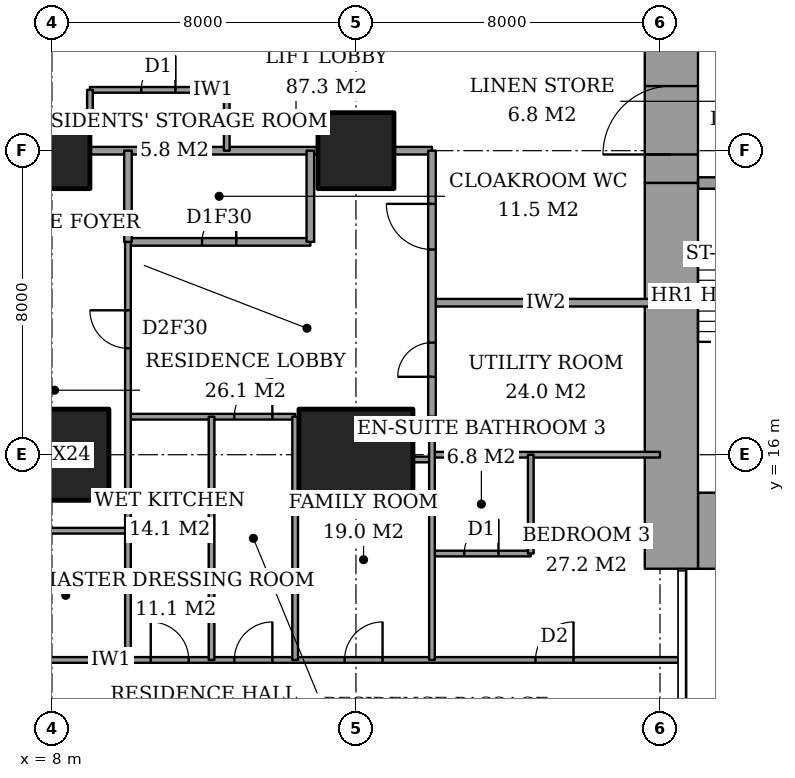
"""IFC4 building model, lengths in metres.
Left out: names, types, materials, properties, quantities, classifications, styles, units other than length and angle.
Written with IfcOpenShell. Run it as: python <this file> out.ifc"""

import sys

from ifc_helpers import new_model, si_unit, direction, frame, frame_2d, origin, origin_2d, place, context, subcontext, project, spatial, rectangle, extrude, element, fill, save


model = new_model("IFC4")
c1 = context("Model", 3, precision=1e-05, world=origin(), true_north=direction((0.0, 1.0)))
c2 = subcontext(c1, "Body", "Model", "MODEL_VIEW")
j1 = project(units=[si_unit("LENGTHUNIT", "METRE"), si_unit("PLANEANGLEUNIT", "RADIAN")], contexts=[c1])
p1 = place(None, origin())
s1 = spatial("IfcSite", under=j1, at=p1, CompositionType="ELEMENT")
p2 = place(p1, origin())
s2 = spatial("IfcBuilding", under=s1, at=p2, CompositionType="ELEMENT")
p3 = place(p2, frame((0.0, 0.0, 51.2)))
s3 = spatial("IfcBuildingStorey", under=s2, at=p3, CompositionType="ELEMENT", Elevation=51.2)
p4 = place(p3, frame((8.0, 16.0, 0.0), z_axis=(0.0, 0.0, 1.0), x_axis=(1.0, 0.0, 0.0)))
e1 = element("IfcColumn", 1, at=p4, inside=s3, PredefinedType="COLUMN", context=c2, shape_type="SweptSolid", body=[
    extrude(rectangle(XDim=3.0, YDim=2.4, at=origin_2d()), origin(), (0.0, 0.0, 1.0), 3.6),
])
p5 = place(p3, frame((8.0, 24.0, 0.0), z_axis=(0.0, 0.0, 1.0), x_axis=(1.0, 0.0, 0.0)))
e2 = element("IfcColumn", 2, at=p5, inside=s3, PredefinedType="COLUMN", context=c2, shape_type="SweptSolid", body=[
    extrude(rectangle(XDim=2.0, YDim=2.0, at=origin_2d()), origin(), (0.0, 0.0, 1.0), 3.6),
])
p6 = place(p3, frame((16.0, 16.0, 0.0), z_axis=(0.0, 0.0, 1.0), x_axis=(1.0, 0.0, 0.0)))
e3 = element("IfcColumn", 3, at=p6, inside=s3, PredefinedType="COLUMN", context=c2, shape_type="SweptSolid", body=[
    extrude(rectangle(XDim=3.0, YDim=2.4, at=origin_2d()), origin(), (0.0, 0.0, 1.0), 3.6),
])
p7 = place(p3, frame((16.0, 24.0, 0.0), z_axis=(0.0, 0.0, 1.0), x_axis=(1.0, 0.0, 0.0)))
e4 = element("IfcColumn", 4, at=p7, inside=s3, PredefinedType="COLUMN", context=c2, shape_type="SweptSolid", body=[
    extrude(rectangle(XDim=2.0, YDim=2.0, at=origin_2d()), origin(), (0.0, 0.0, 1.0), 3.6),
])
p8 = place(p3, frame((25.0, 14.0, 0.0), z_axis=(0.0, 0.0, 1.0), x_axis=(1.0, 0.0, 0.0)))
e5 = element("IfcWall", 5, at=p8, inside=s3, PredefinedType="SHEAR", context=c2, shape_type="SweptSolid", body=[
    extrude(rectangle(XDim=3.15, YDim=2.0, at=frame_2d((1.575, 0.0))), origin(), (0.0, 0.0, 1.0), 3.6),
])
p9 = place(p3, frame((24.3, 13.0, 0.0), z_axis=(0.0, 0.0, 1.0), x_axis=(0.0, 1.0, 0.0)))
e6 = element("IfcWall", 6, at=p9, inside=s3, PredefinedType="SHEAR", context=c2, shape_type="SweptSolid", body=[
    extrude(rectangle(XDim=10.15, YDim=1.4, at=frame_2d((5.075, 0.0))), origin(), (0.0, 0.0, 1.0), 3.6),
])
p10 = place(p3, frame((24.3, 23.15, 0.0), z_axis=(0.0, 0.0, 1.0), x_axis=(0.0, 1.0, 0.0)))
e7 = element("IfcWall", 7, at=p10, inside=s3, PredefinedType="SHEAR", context=c2, shape_type="SweptSolid", body=[
    extrude(rectangle(XDim=11.85, YDim=1.4, at=frame_2d((5.925, 0.0))), origin(), (0.0, 0.0, 1.0), 3.6),
])
p11 = place(p10, frame((0.75, 0.0, 0.0)))
e8 = element("IfcOpeningElement", 8, at=p11, cuts=e7, PredefinedType="OPENING", context=c2, shape_type="SweptSolid", body=[
    extrude(rectangle(XDim=1.8, YDim=2.4, at=frame_2d((0.9, 1.2))), frame((0.0, 0.71, 0.0), z_axis=(0.0, -1.0, 0.0), x_axis=(1.0, 0.0, 0.0)), (0.0, 0.0, 1.0), 1.42),
])
p12 = place(p3, frame((25.0, 23.15, 0.0), z_axis=(0.0, 0.0, 1.0), x_axis=(1.0, 0.0, 0.0)))
e9 = element("IfcWall", 9, at=p12, inside=s3, PredefinedType="SHEAR", context=c2, shape_type="SweptSolid", body=[
    extrude(rectangle(XDim=3.15, YDim=0.3, at=frame_2d((1.575, 0.0))), origin(), (0.0, 0.0, 1.0), 3.6),
])
p13 = place(p12, frame((0.6, 0.0, 0.0)))
e10 = element("IfcOpeningElement", 10, at=p13, cuts=e9, PredefinedType="OPENING", context=c2, shape_type="SweptSolid", body=[
    extrude(rectangle(XDim=1.0, YDim=2.1, at=frame_2d((0.5, 1.05))), frame((0.0, 0.16, 0.0), z_axis=(0.0, -1.0, 0.0), x_axis=(1.0, 0.0, 0.0)), (0.0, 0.0, 1.0), 0.32),
])
p14 = place(p3, frame((-0.45, 10.6, 0.0), z_axis=(0.0, 0.0, 1.0), x_axis=(1.0, 0.0, 0.0)))
e11 = element("IfcWall", 11, at=p14, inside=s3, PredefinedType="PARTITIONING", context=c2, shape_type="SweptSolid", body=[
    extrude(rectangle(XDim=25.011, YDim=0.15, at=frame_2d((12.505, 0.0))), origin(), (0.0, 0.0, 1.0), 3.35),
])
p15 = place(p14, frame((13.25, 0.0, 0.0)))
e12 = element("IfcOpeningElement", 12, at=p15, cuts=e11, PredefinedType="OPENING", context=c2, shape_type="SweptSolid", body=[
    extrude(rectangle(XDim=1.0, YDim=2.1, at=frame_2d((0.5, 1.05))), frame((0.0, 0.085, 0.0), z_axis=(0.0, -1.0, 0.0), x_axis=(1.0, 0.0, 0.0)), (0.0, 0.0, 1.0), 0.17),
])
p16 = place(p14, frame((3.087, 0.0, 0.0)))
e13 = element("IfcOpeningElement", 13, at=p16, cuts=e11, PredefinedType="OPENING", context=c2, shape_type="SweptSolid", body=[
    extrude(rectangle(XDim=1.0, YDim=2.1, at=frame_2d((0.5, 1.05))), frame((0.0, 0.085, 0.0), z_axis=(0.0, -1.0, 0.0), x_axis=(1.0, 0.0, 0.0)), (0.0, 0.0, 1.0), 0.17),
])
p17 = place(p14, frame((11.05, 0.0, 0.0)))
e14 = element("IfcOpeningElement", 14, at=p17, cuts=e11, PredefinedType="OPENING", context=c2, shape_type="SweptSolid", body=[
    extrude(rectangle(XDim=1.0, YDim=2.1, at=frame_2d((0.5, 1.05))), frame((0.0, 0.085, 0.0), z_axis=(0.0, -1.0, 0.0), x_axis=(1.0, 0.0, 0.0)), (0.0, 0.0, 1.0), 0.17),
])
p18 = place(p14, frame((16.15, 0.0, 0.0)))
e15 = element("IfcOpeningElement", 15, at=p18, cuts=e11, PredefinedType="OPENING", context=c2, shape_type="SweptSolid", body=[
    extrude(rectangle(XDim=1.0, YDim=2.1, at=frame_2d((0.5, 1.05))), frame((0.0, 0.085, 0.0), z_axis=(0.0, -1.0, 0.0), x_axis=(1.0, 0.0, 0.0)), (0.0, 0.0, 1.0), 0.17),
])
p19 = place(p14, frame((21.175, 0.0, 0.0)))
e16 = element("IfcOpeningElement", 16, at=p19, cuts=e11, PredefinedType="OPENING", context=c2, shape_type="SweptSolid", body=[
    extrude(rectangle(XDim=1.0, YDim=2.1, at=frame_2d((0.5, 1.05))), frame((0.0, 0.085, 0.0), z_axis=(0.0, -1.0, 0.0), x_axis=(1.0, 0.0, 0.0)), (0.0, 0.0, 1.0), 0.17),
])
p20 = place(p3, frame((18.0, 13.4, 0.0), z_axis=(0.0, 0.0, 1.0), x_axis=(1.0, 0.0, 0.0)))
e17 = element("IfcWall", 17, at=p20, inside=s3, PredefinedType="PARTITIONING", context=c2, shape_type="SweptSolid", body=[
    extrude(rectangle(XDim=2.6, YDim=0.15, at=frame_2d((1.3, 0.0))), origin(), (0.0, 0.0, 1.0), 3.35),
])
p21 = place(p20, frame((0.85, 0.0, 0.0)))
e18 = element("IfcOpeningElement", 18, at=p21, cuts=e17, PredefinedType="OPENING", context=c2, shape_type="SweptSolid", body=[
    extrude(rectangle(XDim=0.9, YDim=2.1, at=frame_2d((0.45, 1.05))), frame((0.0, 0.085, 0.0), z_axis=(0.0, -1.0, 0.0), x_axis=(1.0, 0.0, 0.0)), (0.0, 0.0, 1.0), 0.17),
])
p22 = place(p3, frame((6.725, 14.0, 0.0), z_axis=(0.0, 0.0, 1.0), x_axis=(1.0, 0.0, 0.0)))
e19 = element("IfcWall", 19, at=p22, inside=s3, PredefinedType="PARTITIONING", context=c2, shape_type="SweptSolid", body=[
    extrude(rectangle(XDim=3.275, YDim=0.15, at=frame_2d((1.637, 0.0))), origin(), (0.0, 0.0, 1.0), 3.35),
])
p23 = place(p3, frame((17.5, 15.875, 0.0), z_axis=(0.0, 0.0, 1.0), x_axis=(1.0, 0.0, 0.0)))
e20 = element("IfcWall", 20, at=p23, inside=s3, PredefinedType="PARTITIONING", context=c2, shape_type="SweptSolid", body=[
    extrude(rectangle(XDim=0.5, YDim=0.15, at=frame_2d((0.25, 0.0))), origin(), (0.0, 0.0, 1.0), 2.634),
])
p24 = place(p3, frame((18.0, 16.0, 0.0), z_axis=(0.0, 0.0, 1.0), x_axis=(1.0, 0.0, 0.0)))
e21 = element("IfcWall", 21, at=p24, inside=s3, PredefinedType="PARTITIONING", context=c2, shape_type="SweptSolid", body=[
    extrude(rectangle(XDim=6.0, YDim=0.15, at=frame_2d((3.0, 0.0))), origin(), (0.0, 0.0, 1.0), 2.634),
])
p25 = place(p3, frame((10.0, 17.0, 0.0), z_axis=(0.0, 0.0, 1.0), x_axis=(1.0, 0.0, 0.0)))
e22 = element("IfcWall", 22, at=p25, inside=s3, PredefinedType="PARTITIONING", context=c2, shape_type="SweptSolid", body=[
    extrude(rectangle(XDim=4.4, YDim=0.15, at=frame_2d((2.2, 0.0))), origin(), (0.0, 0.0, 1.0), 3.35),
])
p26 = place(p25, frame((2.8, 0.0, 0.0)))
e23 = element("IfcOpeningElement", 23, at=p26, cuts=e22, PredefinedType="OPENING", context=c2, shape_type="SweptSolid", body=[
    extrude(rectangle(XDim=1.0, YDim=2.1, at=frame_2d((0.5, 1.05))), frame((0.0, 0.085, 0.0), z_axis=(0.0, -1.0, 0.0), x_axis=(1.0, 0.0, 0.0)), (0.0, 0.0, 1.0), 0.17),
])
p27 = place(p3, frame((18.0, 20.0, 0.0), z_axis=(0.0, 0.0, 1.0), x_axis=(1.0, 0.0, 0.0)))
e24 = element("IfcWall", 24, at=p27, inside=s3, PredefinedType="PARTITIONING", context=c2, shape_type="SweptSolid", body=[
    extrude(rectangle(XDim=6.0, YDim=0.2, at=frame_2d((3.0, 0.0))), origin(), (0.0, 0.0, 1.0), 3.35),
])
p28 = place(p3, frame((10.0, 21.6, 0.0), z_axis=(0.0, 0.0, 1.0), x_axis=(1.0, 0.0, 0.0)))
e25 = element("IfcWall", 25, at=p28, inside=s3, PredefinedType="PARTITIONING", context=c2, shape_type="SweptSolid", body=[
    extrude(rectangle(XDim=4.8, YDim=0.2, at=frame_2d((2.4, 0.0))), origin(), (0.0, 0.0, 1.0), 3.35),
])
p29 = place(p28, frame((1.95, 0.0, 0.0)))
e26 = element("IfcOpeningElement", 26, at=p29, cuts=e25, PredefinedType="OPENING", context=c2, shape_type="SweptSolid", body=[
    extrude(rectangle(XDim=0.9, YDim=2.1, at=frame_2d((0.45, 1.05))), frame((0.0, 0.11, 0.0), z_axis=(0.0, -1.0, 0.0), x_axis=(1.0, 0.0, 0.0)), (0.0, 0.0, 1.0), 0.22),
])
p30 = place(p3, frame((9.0, 24.0, 0.0), z_axis=(0.0, 0.0, 1.0), x_axis=(1.0, 0.0, 0.0)))
e27 = element("IfcWall", 27, at=p30, inside=s3, PredefinedType="PARTITIONING", context=c2, shape_type="SweptSolid", body=[
    extrude(rectangle(XDim=6.0, YDim=0.2, at=frame_2d((3.0, 0.0))), origin(), (0.0, 0.0, 1.0), 3.35),
])
p31 = place(p3, frame((17.0, 24.0, 0.0), z_axis=(0.0, 0.0, 1.0), x_axis=(1.0, 0.0, 0.0)))
e28 = element("IfcWall", 28, at=p31, inside=s3, PredefinedType="PARTITIONING", context=c2, shape_type="SweptSolid", body=[
    extrude(rectangle(XDim=1.0, YDim=0.2, at=frame_2d((0.5, 0.0))), origin(), (0.0, 0.0, 1.0), 3.35),
])
p32 = place(p3, frame((9.0, 25.6, 0.0), z_axis=(0.0, 0.0, 1.0), x_axis=(1.0, 0.0, 0.0)))
e29 = element("IfcWall", 29, at=p32, inside=s3, PredefinedType="PARTITIONING", context=c2, shape_type="SweptSolid", body=[
    extrude(rectangle(XDim=3.6, YDim=0.15, at=frame_2d((1.8, 0.0))), origin(), (0.0, 0.0, 1.0), 3.35),
])
p33 = place(p32, frame((1.35, 0.0, 0.0)))
e30 = element("IfcOpeningElement", 30, at=p33, cuts=e29, PredefinedType="OPENING", context=c2, shape_type="SweptSolid", body=[
    extrude(rectangle(XDim=0.9, YDim=2.1, at=frame_2d((0.45, 1.05))), frame((0.0, 0.085, 0.0), z_axis=(0.0, -1.0, 0.0), x_axis=(1.0, 0.0, 0.0)), (0.0, 0.0, 1.0), 0.17),
])
p34 = place(p3, frame((9.0, 25.0, 0.0), z_axis=(0.0, 0.0, 1.0), x_axis=(0.0, 1.0, 0.0)))
e31 = element("IfcWall", 31, at=p34, inside=s3, PredefinedType="PARTITIONING", context=c2, shape_type="SweptSolid", body=[
    extrude(rectangle(XDim=0.6, YDim=0.15, at=frame_2d((0.3, 0.0))), origin(), (0.0, 0.0, 1.0), 3.35),
])
p35 = place(p3, frame((10.0, 21.6, 0.0), z_axis=(0.0, 0.0, 1.0), x_axis=(0.0, 1.0, 0.0)))
e32 = element("IfcWall", 32, at=p35, inside=s3, PredefinedType="PARTITIONING", context=c2, shape_type="SweptSolid", body=[
    extrude(rectangle(XDim=2.4, YDim=0.2, at=frame_2d((1.2, 0.0))), origin(), (0.0, 0.0, 1.0), 3.35),
])
p36 = place(p3, frame((10.0, 10.6, 0.0), z_axis=(0.0, 0.0, 1.0), x_axis=(0.0, 1.0, 0.0)))
e33 = element("IfcWall", 33, at=p36, inside=s3, PredefinedType="PARTITIONING", context=c2, shape_type="SweptSolid", body=[
    extrude(rectangle(XDim=11.0, YDim=0.15, at=frame_2d((5.5, 0.0))), origin(), (0.0, 0.0, 1.0), 3.35),
])
p37 = place(p36, frame((8.2, 0.0, 0.0)))
e34 = element("IfcOpeningElement", 34, at=p37, cuts=e33, PredefinedType="OPENING", context=c2, shape_type="SweptSolid", body=[
    extrude(rectangle(XDim=1.0, YDim=2.1, at=frame_2d((0.5, 1.05))), frame((0.0, 0.085, 0.0), z_axis=(0.0, -1.0, 0.0), x_axis=(1.0, 0.0, 0.0)), (0.0, 0.0, 1.0), 0.17),
])
p38 = place(p3, frame((12.2, 10.6, 0.0), z_axis=(0.0, 0.0, 1.0), x_axis=(0.0, 1.0, 0.0)))
e35 = element("IfcWall", 35, at=p38, inside=s3, PredefinedType="PARTITIONING", context=c2, shape_type="SweptSolid", body=[
    extrude(rectangle(XDim=6.4, YDim=0.15, at=frame_2d((3.2, 0.0))), origin(), (0.0, 0.0, 1.0), 3.35),
])
p39 = place(p3, frame((12.6, 24.0, 0.0), z_axis=(0.0, 0.0, 1.0), x_axis=(0.0, 1.0, 0.0)))
e36 = element("IfcWall", 36, at=p39, inside=s3, PredefinedType="PARTITIONING", context=c2, shape_type="SweptSolid", body=[
    extrude(rectangle(XDim=1.6, YDim=0.15, at=frame_2d((0.8, 0.0))), origin(), (0.0, 0.0, 1.0), 3.35),
])
p40 = place(p3, frame((14.4, 10.6, 0.0), z_axis=(0.0, 0.0, 1.0), x_axis=(0.0, 1.0, 0.0)))
e37 = element("IfcWall", 37, at=p40, inside=s3, PredefinedType="PARTITIONING", context=c2, shape_type="SweptSolid", body=[
    extrude(rectangle(XDim=6.4, YDim=0.15, at=frame_2d((3.2, 0.0))), origin(), (0.0, 0.0, 1.0), 3.35),
])
p41 = place(p3, frame((14.8, 21.6, 0.0), z_axis=(0.0, 0.0, 1.0), x_axis=(0.0, 1.0, 0.0)))
e38 = element("IfcWall", 38, at=p41, inside=s3, PredefinedType="PARTITIONING", context=c2, shape_type="SweptSolid", body=[
    extrude(rectangle(XDim=2.4, YDim=0.2, at=frame_2d((1.2, 0.0))), origin(), (0.0, 0.0, 1.0), 3.35),
])
p42 = place(p3, frame((18.0, 17.0, 0.0), z_axis=(0.0, 0.0, 1.0), x_axis=(0.0, 1.0, 0.0)))
e39 = element("IfcWall", 39, at=p42, inside=s3, PredefinedType="PARTITIONING", context=c2, shape_type="SweptSolid", body=[
    extrude(rectangle(XDim=7.0, YDim=0.2, at=frame_2d((3.5, 0.0))), origin(), (0.0, 0.0, 1.0), 3.35),
])
p43 = place(p42, frame((4.4, 0.0, 0.0)))
e40 = element("IfcOpeningElement", 40, at=p43, cuts=e39, PredefinedType="OPENING", context=c2, shape_type="SweptSolid", body=[
    extrude(rectangle(XDim=1.2, YDim=2.4, at=frame_2d((0.6, 1.2))), frame((0.0, 0.11, 0.0), z_axis=(0.0, -1.0, 0.0), x_axis=(1.0, 0.0, 0.0)), (0.0, 0.0, 1.0), 0.22),
])
p44 = place(p42, frame((1.05, 0.0, 0.0)))
e41 = element("IfcOpeningElement", 41, at=p44, cuts=e39, PredefinedType="OPENING", context=c2, shape_type="SweptSolid", body=[
    extrude(rectangle(XDim=0.9, YDim=2.1, at=frame_2d((0.45, 1.05))), frame((0.0, 0.11, 0.0), z_axis=(0.0, -1.0, 0.0), x_axis=(1.0, 0.0, 0.0)), (0.0, 0.0, 1.0), 0.22),
])
p45 = place(p3, frame((18.0, 10.6, 0.0), z_axis=(0.0, 0.0, 1.0), x_axis=(0.0, 1.0, 0.0)))
e42 = element("IfcWall", 42, at=p45, inside=s3, PredefinedType="PARTITIONING", context=c2, shape_type="SweptSolid", body=[
    extrude(rectangle(XDim=6.4, YDim=0.15, at=frame_2d((3.2, 0.0))), origin(), (0.0, 0.0, 1.0), 3.35),
])
p46 = place(p3, frame((20.6, 13.4, 0.0), z_axis=(0.0, 0.0, 1.0), x_axis=(0.0, 1.0, 0.0)))
e43 = element("IfcWall", 43, at=p46, inside=s3, PredefinedType="PARTITIONING", context=c2, shape_type="SweptSolid", body=[
    extrude(rectangle(XDim=2.6, YDim=0.15, at=frame_2d((1.3, 0.0))), origin(), (0.0, 0.0, 1.0), 3.35),
])
p47 = place(p15, origin())
e44 = element("IfcDoor", 44, at=p47, inside=s3, OperationType="SINGLE_SWING_LEFT", PredefinedType="DOOR", context=c2, shape_type="SweptSolid", body=[
    extrude(rectangle(XDim=1.0, YDim=2.1, at=frame_2d((0.5, 1.05))), frame((0.0, 0.025, 0.0), z_axis=(0.0, -1.0, 0.0), x_axis=(1.0, 0.0, 0.0)), (0.0, 0.0, 1.0), 0.05),
])
fill(e12, e44)
p48 = place(p37, origin())
e45 = element("IfcDoor", 45, at=p48, inside=s3, OperationType="SINGLE_SWING_LEFT", PredefinedType="DOOR", context=c2, shape_type="SweptSolid", body=[
    extrude(rectangle(XDim=1.0, YDim=2.1, at=frame_2d((0.5, 1.05))), frame((0.0, 0.025, 0.0), z_axis=(0.0, -1.0, 0.0), x_axis=(1.0, 0.0, 0.0)), (0.0, 0.0, 1.0), 0.05),
])
fill(e34, e45)
p49 = place(p29, origin())
e46 = element("IfcDoor", 46, at=p49, inside=s3, OperationType="SINGLE_SWING_LEFT", PredefinedType="DOOR", context=c2, shape_type="SweptSolid", body=[
    extrude(rectangle(XDim=0.9, YDim=2.1, at=frame_2d((0.45, 1.05))), frame((0.0, 0.025, 0.0), z_axis=(0.0, -1.0, 0.0), x_axis=(1.0, 0.0, 0.0)), (0.0, 0.0, 1.0), 0.05),
])
fill(e26, e46)
p50 = place(p43, origin())
e47 = element("IfcDoor", 47, at=p50, inside=s3, OperationType="SINGLE_SWING_LEFT", PredefinedType="DOOR", context=c2, shape_type="SweptSolid", body=[
    extrude(rectangle(XDim=1.2, YDim=2.4, at=frame_2d((0.6, 1.2))), frame((0.0, 0.025, 0.0), z_axis=(0.0, -1.0, 0.0), x_axis=(1.0, 0.0, 0.0)), (0.0, 0.0, 1.0), 0.05),
])
fill(e40, e47)
p51 = place(p17, origin())
e48 = element("IfcDoor", 48, at=p51, inside=s3, OperationType="SINGLE_SWING_RIGHT", PredefinedType="DOOR", context=c2, shape_type="SweptSolid", body=[
    extrude(rectangle(XDim=1.0, YDim=2.1, at=frame_2d((0.5, 1.05))), frame((0.0, 0.025, 0.0), z_axis=(0.0, -1.0, 0.0), x_axis=(1.0, 0.0, 0.0)), (0.0, 0.0, 1.0), 0.05),
])
fill(e14, e48)
p52 = place(p26, origin())
e49 = element("IfcDoor", 49, at=p52, inside=s3, OperationType="SINGLE_SWING_LEFT", PredefinedType="DOOR", context=c2, shape_type="SweptSolid", body=[
    extrude(rectangle(XDim=1.0, YDim=2.1, at=frame_2d((0.5, 1.05))), frame((0.0, 0.025, 0.0), z_axis=(0.0, -1.0, 0.0), x_axis=(1.0, 0.0, 0.0)), (0.0, 0.0, 1.0), 0.05),
])
fill(e23, e49)
p53 = place(p18, origin())
e50 = element("IfcDoor", 50, at=p53, inside=s3, OperationType="SINGLE_SWING_LEFT", PredefinedType="DOOR", context=c2, shape_type="SweptSolid", body=[
    extrude(rectangle(XDim=1.0, YDim=2.1, at=frame_2d((0.5, 1.05))), frame((0.0, 0.025, 0.0), z_axis=(0.0, -1.0, 0.0), x_axis=(1.0, 0.0, 0.0)), (0.0, 0.0, 1.0), 0.05),
])
fill(e15, e50)
p54 = place(p21, origin())
e51 = element("IfcDoor", 51, at=p54, inside=s3, OperationType="SINGLE_SWING_LEFT", PredefinedType="DOOR", context=c2, shape_type="SweptSolid", body=[
    extrude(rectangle(XDim=0.9, YDim=2.1, at=frame_2d((0.45, 1.05))), frame((0.0, 0.025, 0.0), z_axis=(0.0, -1.0, 0.0), x_axis=(1.0, 0.0, 0.0)), (0.0, 0.0, 1.0), 0.05),
])
fill(e18, e51)
p55 = place(p19, origin())
e52 = element("IfcDoor", 52, at=p55, inside=s3, OperationType="SINGLE_SWING_LEFT", PredefinedType="DOOR", context=c2, shape_type="SweptSolid", body=[
    extrude(rectangle(XDim=1.0, YDim=2.1, at=frame_2d((0.5, 1.05))), frame((0.0, 0.025, 0.0), z_axis=(0.0, -1.0, 0.0), x_axis=(1.0, 0.0, 0.0)), (0.0, 0.0, 1.0), 0.05),
])
fill(e16, e52)
p56 = place(p44, origin())
e53 = element("IfcDoor", 53, at=p56, inside=s3, OperationType="SINGLE_SWING_RIGHT", PredefinedType="DOOR", context=c2, shape_type="SweptSolid", body=[
    extrude(rectangle(XDim=0.9, YDim=2.1, at=frame_2d((0.45, 1.05))), frame((0.0, 0.025, 0.0), z_axis=(0.0, -1.0, 0.0), x_axis=(1.0, 0.0, 0.0)), (0.0, 0.0, 1.0), 0.05),
])
fill(e41, e53)
p57 = place(p33, origin())
e54 = element("IfcDoor", 54, at=p57, inside=s3, OperationType="SINGLE_SWING_LEFT", PredefinedType="DOOR", context=c2, shape_type="SweptSolid", body=[
    extrude(rectangle(XDim=0.9, YDim=2.1, at=frame_2d((0.45, 1.05))), frame((0.0, 0.025, 0.0), z_axis=(0.0, -1.0, 0.0), x_axis=(1.0, 0.0, 0.0)), (0.0, 0.0, 1.0), 0.05),
])
fill(e30, e54)
p58 = place(p11, origin())
e55 = element("IfcDoor", 55, at=p58, inside=s3, OperationType="DOUBLE_DOOR_DOUBLE_SWING", PredefinedType="DOOR", context=c2, shape_type="SweptSolid", body=[
    extrude(rectangle(XDim=1.8, YDim=2.4, at=frame_2d((0.9, 1.2))), frame((0.0, 0.025, 0.0), z_axis=(0.0, -1.0, 0.0), x_axis=(1.0, 0.0, 0.0)), (0.0, 0.0, 1.0), 0.05),
])
fill(e8, e55)
save(model, sys.argv[1])
